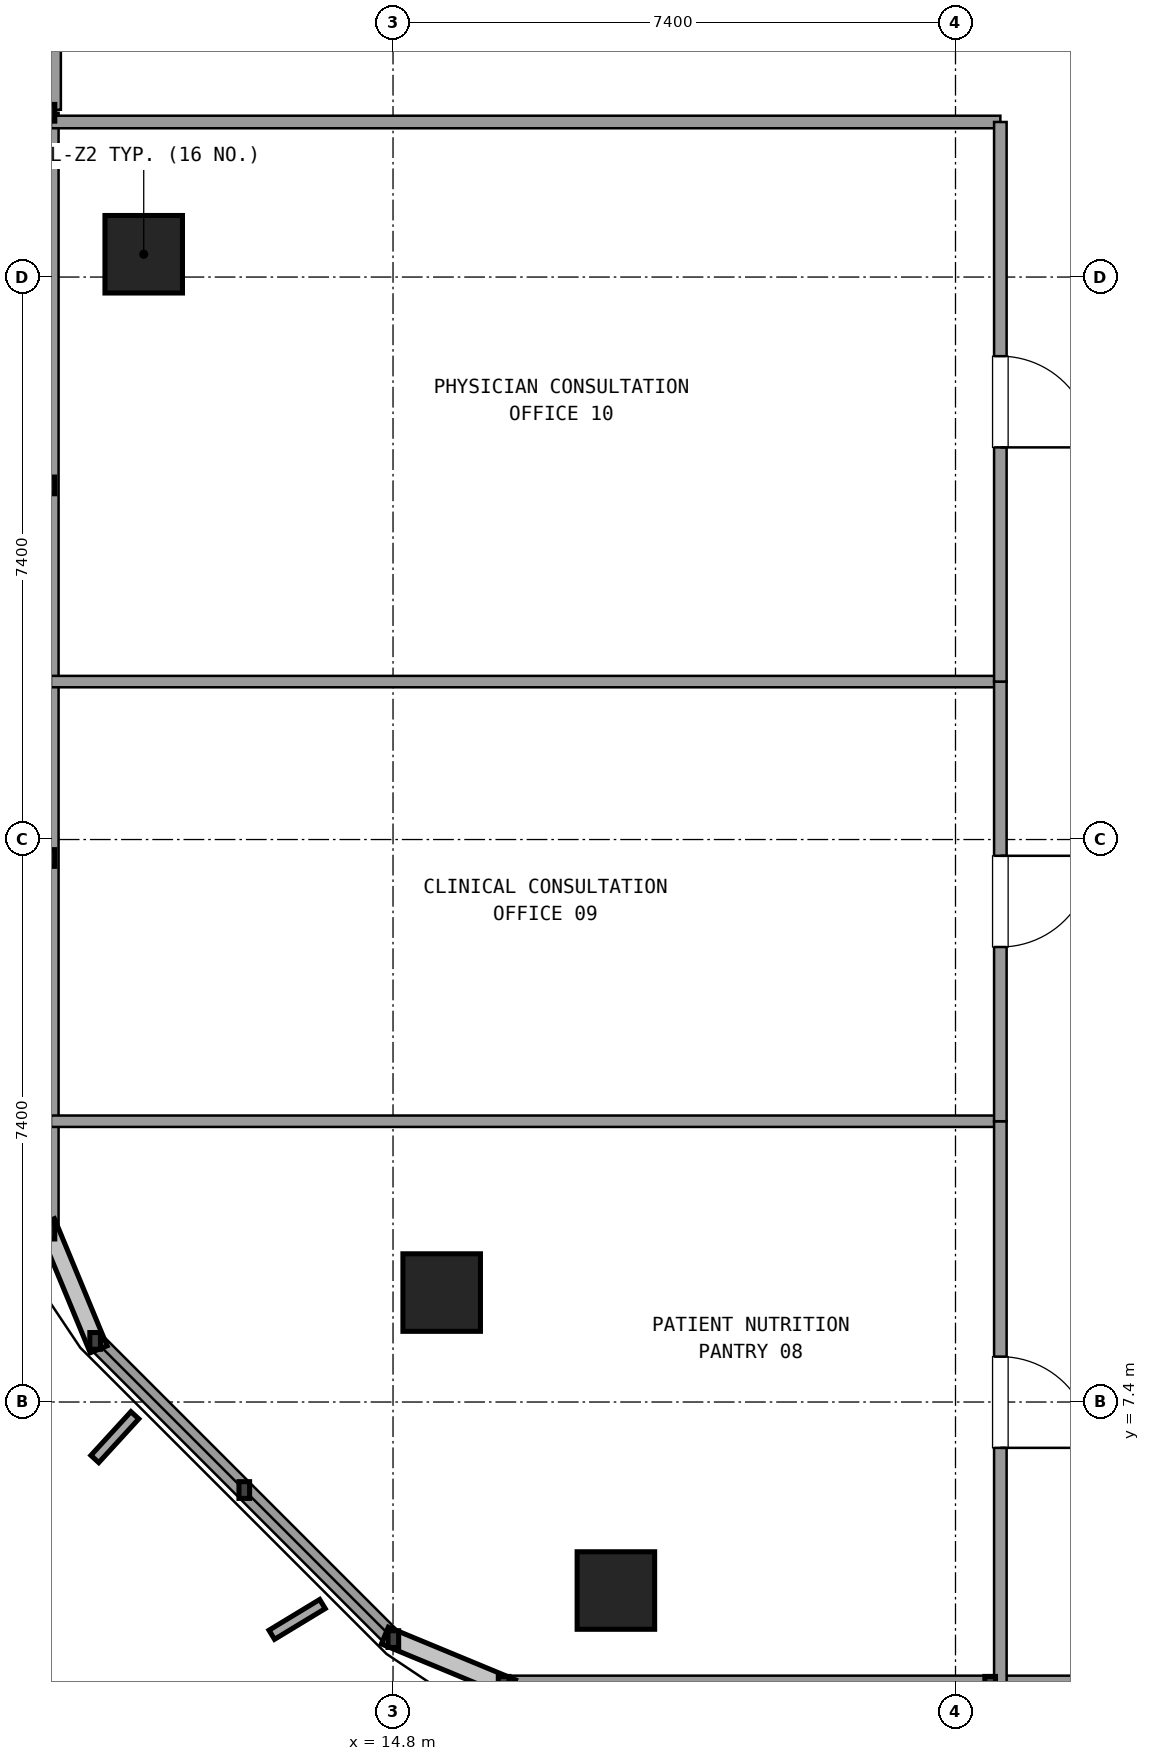
"""IFC4 building model, lengths in metres.
Left out: names, types, materials, properties, quantities, classifications, styles, units other than length and angle.
Written with IfcOpenShell. Run it as: python <this file> out.ifc"""

import sys

from ifc_helpers import new_model, si_unit, direction, frame, frame_2d, origin, origin_2d, place, context, subcontext, project, spatial, rectangle, extrude, element, fill, save


model = new_model("IFC4")
c1 = context("Model", 3, precision=1e-05, world=origin(), true_north=direction((0.0, 1.0)))
c2 = subcontext(c1, "Body", "Model", "MODEL_VIEW")
j1 = project(units=[si_unit("LENGTHUNIT", "METRE"), si_unit("PLANEANGLEUNIT", "RADIAN")], contexts=[c1])
p1 = place(None, origin())
s1 = spatial("IfcSite", under=j1, at=p1, CompositionType="ELEMENT")
p2 = place(p1, origin())
s2 = spatial("IfcBuilding", under=s1, at=p2, CompositionType="ELEMENT")
p3 = place(p2, frame((0.0, 0.0, 84.78)))
s3 = spatial("IfcBuildingStorey", under=s2, at=p3, CompositionType="ELEMENT", Elevation=84.78)
p4 = place(p3, frame((11.52, 22.5, 0.0), z_axis=(0.0, 0.0, 1.0), x_axis=(1.0, 0.0, 0.0)))
e1 = element("IfcColumn", 1, at=p4, inside=s3, PredefinedType="COLUMN", context=c2, shape_type="SweptSolid", body=[
    extrude(rectangle(XDim=1.02, YDim=1.02, at=origin_2d()), origin(), (0.0, 0.0, 1.0), 3.578),
])
for number, where, z_axis, x_axis in (
    (2, (15.44, 8.84, 0.0), (0.0, 0.0, 1.0), (1.0, 0.0, 0.0)),
    (3, (17.732, 4.92, 0.0), (0.0, 0.0, 1.0), (1.0, 0.0, 0.0)),
):
    element("IfcColumn", number, at=place(p3, frame(where, z_axis=z_axis, x_axis=x_axis)), inside=s3, PredefinedType="COLUMN", context=c2, shape_type="SweptSolid", body=[
        extrude(rectangle(XDim=1.02, YDim=1.02, at=origin_2d()), origin(), (0.0, 0.0, 1.0), 3.577),
    ])
p5 = place(p3, frame((16.255, 3.68, 0.0), z_axis=(0.0, 0.0, 1.0), x_axis=(1.0, 0.0, 0.0)))
e4 = element("IfcWall", 4, at=p5, inside=s3, PredefinedType="SOLIDWALL", context=c2, shape_type="SweptSolid", body=[
    extrude(rectangle(XDim=19.204, YDim=0.24, at=frame_2d((9.602, 0.0))), origin(), (0.0, 0.0, 1.0), 0.85),
])
p6 = place(p3, frame((10.28, 27.401, 0.0), z_axis=(0.0, 0.0, 1.0), x_axis=(0.0, -1.0, 0.0)))
e5 = element("IfcWall", 5, at=p6, inside=s3, PredefinedType="SOLIDWALL", context=c2, shape_type="SweptSolid", body=[
    extrude(rectangle(XDim=3.0, YDim=0.3, at=frame_2d((1.5, 0.0))), origin(), (0.0, 0.0, 1.0), 2.67),
])
p7 = place(p6, frame((0.9, 0.0, 0.0)))
e6 = element("IfcOpeningElement", 6, at=p7, cuts=e5, PredefinedType="OPENING", context=c2, shape_type="SweptSolid", body=[
    extrude(rectangle(XDim=1.2, YDim=2.2, at=frame_2d((0.6, 1.1))), frame((0.0, 0.16, 0.0), z_axis=(0.0, -1.0, 0.0), x_axis=(1.0, 0.0, 0.0)), (0.0, 0.0, 1.0), 0.32),
])
p8 = place(p3, frame((10.28, 24.361, 0.0), z_axis=(0.0, 0.0, 1.0), x_axis=(0.0, -1.0, 0.0)))
e7 = element("IfcWall", 7, at=p8, inside=s3, PredefinedType="SOLIDWALL", context=c2, shape_type="SweptSolid", body=[
    extrude(rectangle(XDim=14.706, YDim=0.24, at=frame_2d((7.353, 0.0))), origin(), (0.0, 0.0, 1.0), 0.85),
])
p9 = place(p3, frame((10.881, 8.204, 0.0), z_axis=(0.0, 0.0, 1.0), x_axis=(0.707084777957, -0.707128783731, 0.0)))
e8 = element("IfcWall", 8, at=p9, inside=s3, PredefinedType="SOLIDWALL", context=c2, shape_type="SweptSolid", body=[
    extrude(rectangle(XDim=5.548, YDim=0.24, at=frame_2d((2.774, 0.0))), origin(), (0.0, 0.0, 1.0), 0.85),
])
p10 = place(p3, frame((10.3, 24.24, 0.0), z_axis=(0.0, 0.0, 1.0), x_axis=(1.0, 0.0, 0.0)))
e9 = element("IfcWall", 9, at=p10, inside=s3, PredefinedType="PARTITIONING", context=c2, shape_type="SweptSolid", body=[
    extrude(rectangle(XDim=12.49, YDim=0.165, at=frame_2d((6.245, 0.0))), origin(), (0.0, 0.0, 1.0), 2.61),
])
p11 = place(p3, frame((22.79, 11.094, 0.0), z_axis=(0.0, 0.0, 1.0), x_axis=(-1.0, 0.0, 0.0)))
e10 = element("IfcWall", 10, at=p11, inside=s3, PredefinedType="PARTITIONING", context=c2, shape_type="SweptSolid", body=[
    extrude(rectangle(XDim=12.49, YDim=0.15, at=frame_2d((6.245, 0.0))), origin(), (0.0, 0.0, 1.0), 2.61),
])
p12 = place(p3, frame((22.79, 3.7, 0.0), z_axis=(0.0, 0.0, 1.0), x_axis=(0.0, 1.0, 0.0)))
e11 = element("IfcWall", 11, at=p12, inside=s3, PredefinedType="PARTITIONING", context=c2, shape_type="SweptSolid", body=[
    extrude(rectangle(XDim=7.394, YDim=0.165, at=frame_2d((3.697, 0.0))), origin(), (0.0, 0.0, 1.0), 2.61),
])
p13 = place(p12, frame((3.097, 0.0, 0.0)))
e12 = element("IfcOpeningElement", 12, at=p13, cuts=e11, PredefinedType="OPENING", context=c2, shape_type="SweptSolid", body=[
    extrude(rectangle(XDim=1.2, YDim=2.15, at=frame_2d((0.6, 1.075))), frame((0.0, 0.093, 0.0), z_axis=(0.0, -1.0, 0.0), x_axis=(1.0, 0.0, 0.0)), (0.0, 0.0, 1.0), 0.185),
])
p14 = place(p3, frame((22.79, 16.878, 0.0), z_axis=(0.0, 0.0, 1.0), x_axis=(-1.0, 0.0, 0.0)))
e13 = element("IfcWall", 13, at=p14, inside=s3, PredefinedType="PARTITIONING", context=c2, shape_type="SweptSolid", body=[
    extrude(rectangle(XDim=12.49, YDim=0.15, at=frame_2d((6.245, 0.0))), origin(), (0.0, 0.0, 1.0), 2.61),
])
p15 = place(p3, frame((22.79, 11.094, 0.0), z_axis=(0.0, 0.0, 1.0), x_axis=(0.0, 1.0, 0.0)))
e14 = element("IfcWall", 14, at=p15, inside=s3, PredefinedType="PARTITIONING", context=c2, shape_type="SweptSolid", body=[
    extrude(rectangle(XDim=5.784, YDim=0.165, at=frame_2d((2.892, 0.0))), origin(), (0.0, 0.0, 1.0), 2.61),
])
p16 = place(p15, frame((2.292, 0.0, 0.0)))
e15 = element("IfcOpeningElement", 15, at=p16, cuts=e14, PredefinedType="OPENING", context=c2, shape_type="SweptSolid", body=[
    extrude(rectangle(XDim=1.2, YDim=2.15, at=frame_2d((0.6, 1.075))), frame((0.0, 0.093, 0.0), z_axis=(0.0, -1.0, 0.0), x_axis=(1.0, 0.0, 0.0)), (0.0, 0.0, 1.0), 0.185),
])
p17 = place(p3, frame((22.79, 16.878, 0.0), z_axis=(0.0, 0.0, 1.0), x_axis=(0.0, 1.0, 0.0)))
e16 = element("IfcWall", 16, at=p17, inside=s3, PredefinedType="PARTITIONING", context=c2, shape_type="SweptSolid", body=[
    extrude(rectangle(XDim=7.362, YDim=0.165, at=frame_2d((3.681, 0.0))), origin(), (0.0, 0.0, 1.0), 2.61),
])
p18 = place(p17, frame((3.081, 0.0, 0.0)))
e17 = element("IfcOpeningElement", 17, at=p18, cuts=e16, PredefinedType="OPENING", context=c2, shape_type="SweptSolid", body=[
    extrude(rectangle(XDim=1.2, YDim=2.15, at=frame_2d((0.6, 1.075))), frame((0.0, 0.093, 0.0), z_axis=(0.0, -1.0, 0.0), x_axis=(1.0, 0.0, 0.0)), (0.0, 0.0, 1.0), 0.185),
])
p19 = place(p13, frame((1.2, 0.0, 0.0), z_axis=(0.0, 0.0, 1.0), x_axis=(-1.0, 0.0, 0.0)))
e18 = element("IfcDoor", 18, at=p19, inside=s3, OperationType="SINGLE_SWING_LEFT", PredefinedType="DOOR", context=c2, shape_type="SweptSolid", body=[
    extrude(rectangle(XDim=1.2, YDim=2.15, at=frame_2d((0.6, 1.075))), frame((0.0, 0.025, 0.0), z_axis=(0.0, -1.0, 0.0), x_axis=(1.0, 0.0, 0.0)), (0.0, 0.0, 1.0), 0.05),
])
fill(e12, e18)
p20 = place(p16, frame((1.2, 0.0, 0.0), z_axis=(0.0, 0.0, 1.0), x_axis=(-1.0, 0.0, 0.0)))
e19 = element("IfcDoor", 19, at=p20, inside=s3, OperationType="SINGLE_SWING_RIGHT", PredefinedType="DOOR", context=c2, shape_type="SweptSolid", body=[
    extrude(rectangle(XDim=1.2, YDim=2.15, at=frame_2d((0.6, 1.075))), frame((0.0, 0.025, 0.0), z_axis=(0.0, -1.0, 0.0), x_axis=(1.0, 0.0, 0.0)), (0.0, 0.0, 1.0), 0.05),
])
fill(e15, e19)
p21 = place(p18, frame((1.2, 0.0, 0.0), z_axis=(0.0, 0.0, 1.0), x_axis=(-1.0, 0.0, 0.0)))
e20 = element("IfcDoor", 20, at=p21, inside=s3, OperationType="SINGLE_SWING_LEFT", PredefinedType="DOOR", context=c2, shape_type="SweptSolid", body=[
    extrude(rectangle(XDim=1.2, YDim=2.15, at=frame_2d((0.6, 1.075))), frame((0.0, 0.025, 0.0), z_axis=(0.0, -1.0, 0.0), x_axis=(1.0, 0.0, 0.0)), (0.0, 0.0, 1.0), 0.05),
])
fill(e17, e20)
save(model, sys.argv[1])
